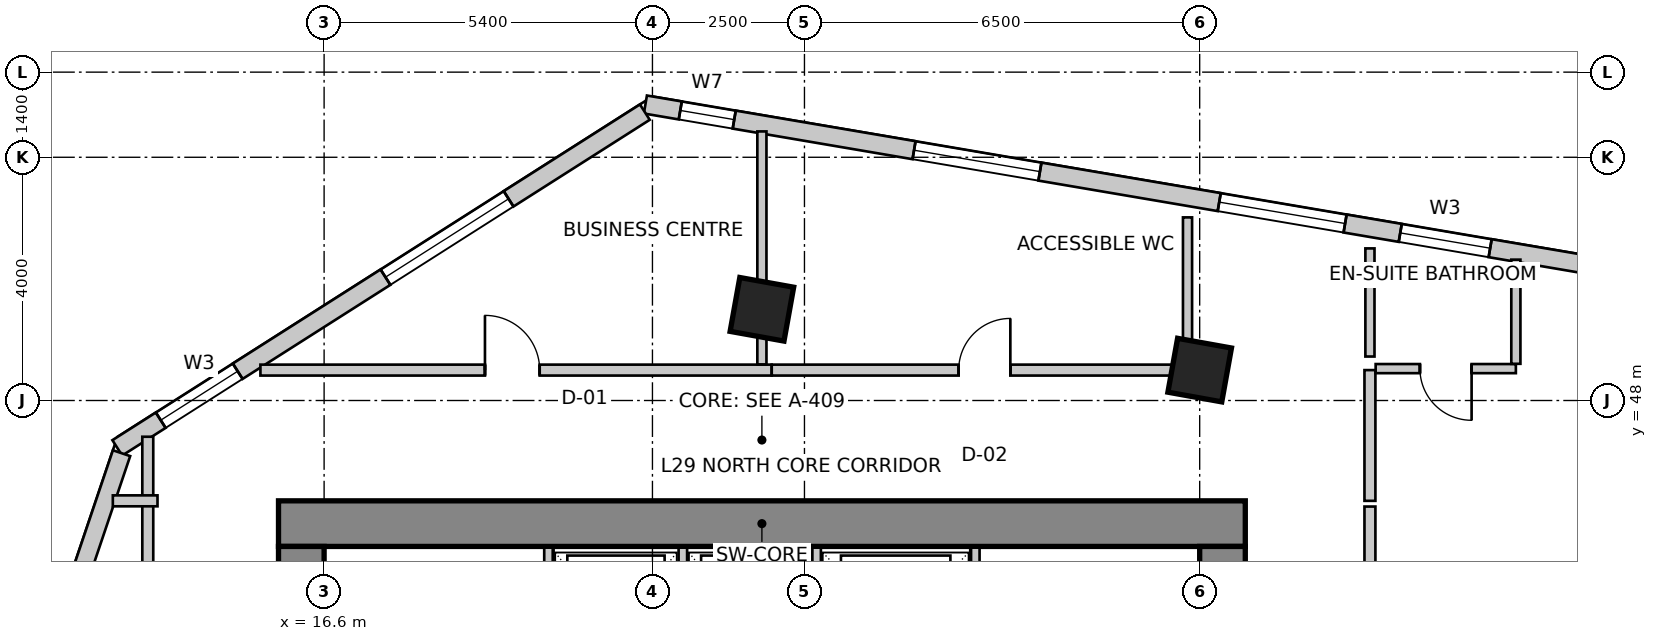
"""IFC4 building model, lengths in metres.
Left out: names, types, materials, properties, quantities, classifications, styles, units other than length and angle.
Written with IfcOpenShell. Run it as: python <this file> out.ifc"""

import sys

from ifc_helpers import new_model, si_unit, direction, frame, frame_2d, origin, origin_2d, place, context, subcontext, project, spatial, rectangle, extrude, source, transform, mapped, element, fill, save


model = new_model("IFC4")
c1 = context("Model", 3, precision=1e-05, world=origin(), true_north=direction((0.0, 1.0)))
c2 = subcontext(c1, "Body", "Model", "MODEL_VIEW")
j1 = project(units=[si_unit("LENGTHUNIT", "METRE"), si_unit("PLANEANGLEUNIT", "RADIAN")], contexts=[c1])
p1 = place(None, origin())
s1 = spatial("IfcSite", under=j1, at=p1, CompositionType="ELEMENT")
p2 = place(p1, origin())
s2 = spatial("IfcBuilding", under=s1, at=p2, CompositionType="ELEMENT")
p3 = place(p2, frame((0.0, 0.0, 121.4)))
s3 = spatial("IfcBuildingStorey", under=s2, at=p3, CompositionType="ELEMENT", Elevation=121.4)
p4 = place(p3, frame((15.85, 45.975, 0.0), z_axis=(0.0, 0.0, 1.0), x_axis=(1.0, 0.0, 0.0)))
e1 = element("IfcWall", 1, at=p4, inside=s3, PredefinedType="SHEAR", context=c2, shape_type="SweptSolid", body=[
    extrude(rectangle(XDim=15.9, YDim=0.75, at=frame_2d((7.95, 0.0))), origin(), (0.0, 0.0, 1.0), 3.6),
])
p5 = place(p3, frame((16.225, 34.2, 0.0), z_axis=(0.0, 0.0, 1.0), x_axis=(0.0, 1.0, 0.0)))
e2 = element("IfcWall", 2, at=p5, inside=s3, PredefinedType="SHEAR", context=c2, shape_type="SweptSolid", body=[
    extrude(rectangle(XDim=11.4, YDim=0.75, at=frame_2d((5.7, 0.0))), origin(), (0.0, 0.0, 1.0), 3.6),
])
m1 = source(origin(), c2, "Body", "SweptSolid", [
    extrude(rectangle(XDim=1.1, YDim=2.15, at=frame_2d((0.55, 1.075))), frame((0.0, 0.385, 0.0), z_axis=(0.0, -1.0, 0.0), x_axis=(1.0, 0.0, 0.0)), (0.0, 0.0, 1.0), 0.77),
])
p6 = place(p5, frame((7.15, 0.0, 0.0)))
e3 = element("IfcOpeningElement", 3, at=p6, cuts=e2, PredefinedType="OPENING", context=c2, shape_type="MappedRepresentation", body=[
    mapped(m1, transform((0.0, 0.0, 0.0), scale=1.0)),
])
p7 = place(p3, frame((31.375, 34.2, 0.0), z_axis=(0.0, 0.0, 1.0), x_axis=(0.0, 1.0, 0.0)))
e4 = element("IfcWall", 4, at=p7, inside=s3, PredefinedType="SHEAR", context=c2, shape_type="SweptSolid", body=[
    extrude(rectangle(XDim=11.4, YDim=0.75, at=frame_2d((5.7, 0.0))), origin(), (0.0, 0.0, 1.0), 3.6),
])
p8 = place(p7, frame((7.35, 0.0, 0.0)))
e5 = element("IfcOpeningElement", 5, at=p8, cuts=e4, PredefinedType="OPENING", context=c2, shape_type="MappedRepresentation", body=[
    mapped(m1, transform((0.0, 0.0, 0.0), scale=1.0)),
])
m2 = source(origin(), c2, "Body", "SweptSolid", [
    extrude(rectangle(XDim=0.9, YDim=0.9, at=origin_2d()), origin(), (0.0, 0.0, 1.0), 3.6),
])
for number, where, z_axis, x_axis in (
    (6, (23.8, 49.5, 0.0), (0.0, 0.0, 1.0), (0.984, -0.177, 0.0)),
    (7, (31.0, 48.5, 0.0), (0.0, 0.0, 1.0), (0.984, -0.177, 0.0)),
):
    element("IfcColumn", number, at=place(p3, frame(where, z_axis=z_axis, x_axis=x_axis)), inside=s3, PredefinedType="COLUMN", context=c2, shape_type="MappedRepresentation", body=[
        mapped(m2, transform((0.0, 0.0, 0.0), scale=1.0)),
    ])
p9 = place(p3, frame((53.561, 47.48, 0.0), z_axis=(0.0, 0.0, 1.0), x_axis=(-0.985845173895, 0.167658262868, 0.0)))
e8 = element("IfcWall", 8, at=p9, inside=s3, PredefinedType="SOLIDWALL", context=c2, shape_type="SweptSolid", body=[
    extrude(rectangle(XDim=32.132, YDim=0.3, at=frame_2d((16.066, 0.0))), origin(), (0.0, 0.0, 1.0), 3.35),
])
m3 = source(origin(), c2, "Body", "SweptSolid", [
    extrude(rectangle(XDim=2.1, YDim=2.0, at=frame_2d((1.05, 1.0))), frame((0.0, 0.16, 0.0), z_axis=(0.0, -1.0, 0.0), x_axis=(1.0, 0.0, 0.0)), (0.0, 0.0, 1.0), 0.32),
])
p10 = place(p9, frame((1.032, 0.0, 0.85)))
e9 = element("IfcOpeningElement", 9, at=p10, cuts=e8, PredefinedType="OPENING", context=c2, shape_type="MappedRepresentation", body=[
    mapped(m3, transform((0.0, 0.0, 0.0), scale=1.0)),
])
p11 = place(p9, frame((6.836, 0.0, 0.85)))
e10 = element("IfcOpeningElement", 10, at=p11, cuts=e8, PredefinedType="OPENING", context=c2, shape_type="MappedRepresentation", body=[
    mapped(m3, transform((0.0, 0.0, 0.0), scale=1.0)),
])
p12 = place(p9, frame((13.599, 0.0, 0.85)))
e11 = element("IfcOpeningElement", 11, at=p12, cuts=e8, PredefinedType="OPENING", context=c2, shape_type="MappedRepresentation", body=[
    mapped(m3, transform((0.0, 0.0, 0.0), scale=1.0)),
])
m4 = source(origin(), c2, "Body", "SweptSolid", [
    extrude(rectangle(XDim=1.5, YDim=1.8, at=frame_2d((0.75, 0.9))), frame((0.0, 0.16, 0.0), z_axis=(0.0, -1.0, 0.0), x_axis=(1.0, 0.0, 0.0)), (0.0, 0.0, 1.0), 0.32),
])
p13 = place(p9, frame((18.039, 0.0, 0.85)))
e12 = element("IfcOpeningElement", 12, at=p13, cuts=e8, PredefinedType="OPENING", context=c2, shape_type="MappedRepresentation", body=[
    mapped(m4, transform((0.0, 0.0, 0.0), scale=1.0)),
])
p14 = place(p9, frame((20.459, 0.0, 0.85)))
e13 = element("IfcOpeningElement", 13, at=p14, cuts=e8, PredefinedType="OPENING", context=c2, shape_type="MappedRepresentation", body=[
    mapped(m3, transform((0.0, 0.0, 0.0), scale=1.0)),
])
p15 = place(p9, frame((25.55, 0.0, 0.85)))
e14 = element("IfcOpeningElement", 14, at=p15, cuts=e8, PredefinedType="OPENING", context=c2, shape_type="MappedRepresentation", body=[
    mapped(m3, transform((0.0, 0.0, 0.0), scale=1.0)),
])
m5 = source(origin(), c2, "Body", "SweptSolid", [
    extrude(rectangle(XDim=0.9, YDim=1.6, at=frame_2d((0.45, 0.8))), frame((0.0, 0.16, 0.0), z_axis=(0.0, -1.0, 0.0), x_axis=(1.0, 0.0, 0.0)), (0.0, 0.0, 1.0), 0.32),
])
p16 = place(p9, frame((30.65, 0.0, 0.85)))
e15 = element("IfcOpeningElement", 15, at=p16, cuts=e8, PredefinedType="OPENING", context=c2, shape_type="MappedRepresentation", body=[
    mapped(m5, transform((0.0, 0.0, 0.0), scale=1.0)),
])
p17 = place(p3, frame((21.875, 52.742, 0.0), z_axis=(0.0, 0.0, 1.0), x_axis=(-0.843662465249, -0.536873956092, 0.0)))
e16 = element("IfcWall", 16, at=p17, inside=s3, PredefinedType="SOLIDWALL", context=c2, shape_type="SweptSolid", body=[
    extrude(rectangle(XDim=10.284, YDim=0.3, at=frame_2d((5.142, 0.0))), origin(), (0.0, 0.0, 1.0), 3.35),
])
m6 = source(origin(), c2, "Body", "SweptSolid", [
    extrude(rectangle(XDim=2.4, YDim=2.2, at=frame_2d((1.2, 1.1))), frame((0.0, 0.16, 0.0), z_axis=(0.0, -1.0, 0.0), x_axis=(1.0, 0.0, 0.0)), (0.0, 0.0, 1.0), 0.32),
])
p18 = place(p17, frame((2.656, 0.0, 0.85)))
e17 = element("IfcOpeningElement", 17, at=p18, cuts=e16, PredefinedType="OPENING", context=c2, shape_type="MappedRepresentation", body=[
    mapped(m6, transform((0.0, 0.0, 0.0), scale=1.0)),
])
p19 = place(p17, frame((7.937, 0.0, 0.85)))
e18 = element("IfcOpeningElement", 18, at=p19, cuts=e16, PredefinedType="OPENING", context=c2, shape_type="MappedRepresentation", body=[
    mapped(m4, transform((0.0, 0.0, 0.0), scale=1.0)),
])
p20 = place(p3, frame((13.269, 47.134, 0.0), z_axis=(0.0, 0.0, 1.0), x_axis=(-0.319929596295, -0.947441319246, 0.0)))
e19 = element("IfcWall", 19, at=p20, inside=s3, PredefinedType="SOLIDWALL", context=c2, shape_type="SweptSolid", body=[
    extrude(rectangle(XDim=16.134, YDim=0.3, at=frame_2d((8.067, 0.0))), origin(), (0.0, 0.0, 1.0), 3.35),
])
p21 = place(p20, frame((2.426, 0.0, 0.85)))
e20 = element("IfcOpeningElement", 20, at=p21, cuts=e19, PredefinedType="OPENING", context=c2, shape_type="MappedRepresentation", body=[
    mapped(m3, transform((0.0, 0.0, 0.0), scale=1.0)),
])
p22 = place(p20, frame((7.211, 0.0, 0.85)))
e21 = element("IfcOpeningElement", 21, at=p22, cuts=e19, PredefinedType="OPENING", context=c2, shape_type="MappedRepresentation", body=[
    mapped(m6, transform((0.0, 0.0, 0.0), scale=1.0)),
])
p23 = place(p20, frame((12.297, 0.0, 0.85)))
e22 = element("IfcOpeningElement", 22, at=p23, cuts=e19, PredefinedType="OPENING", context=c2, shape_type="MappedRepresentation", body=[
    mapped(m3, transform((0.0, 0.0, 0.0), scale=1.0)),
])
for number, where, z_axis, x_axis in (
    (23, (20.29, 43.28, 0.0), (0.0, 0.0, 1.0), (0.0, 1.0, 0.0)),
    (24, (27.31, 43.28, 0.0), (0.0, 0.0, 1.0), (0.0, 1.0, 0.0)),
):
    element("IfcWall", number, at=place(p3, frame(where, z_axis=z_axis, x_axis=x_axis)), inside=s3, PredefinedType="SOLIDWALL", context=c2, shape_type="SweptSolid", body=[
        extrude(rectangle(XDim=2.3, YDim=0.14, at=frame_2d((1.15, 0.0))), origin(), (0.0, 0.0, 1.0), 3.35),
    ])
for number, where, z_axis, x_axis in (
    (25, (22.5, 43.02, 0.0), (0.0, 0.0, 1.0), (0.0, 1.0, 0.0)),
    (26, (24.7, 43.02, 0.0), (0.0, 0.0, 1.0), (0.0, 1.0, 0.0)),
):
    element("IfcWall", number, at=place(p3, frame(where, z_axis=z_axis, x_axis=x_axis)), inside=s3, PredefinedType="SOLIDWALL", context=c2, shape_type="SweptSolid", body=[
        extrude(rectangle(XDim=2.56, YDim=0.14, at=frame_2d((1.28, 0.0))), origin(), (0.0, 0.0, 1.0), 3.35),
    ])
p24 = place(p3, frame((13.7, 33.544, 0.0), z_axis=(0.0, 0.0, 1.0), x_axis=(0.0, 1.0, 0.0)))
e27 = element("IfcWall", 27, at=p24, inside=s3, PredefinedType="PARTITIONING", context=c2, shape_type="SweptSolid", body=[
    extrude(rectangle(XDim=13.86, YDim=0.18, at=frame_2d((6.93, 0.0))), origin(), (0.0, 0.0, 1.0), 2.492),
])
m7 = source(origin(), c2, "Body", "SweptSolid", [
    extrude(rectangle(XDim=0.9, YDim=2.15, at=frame_2d((0.45, 1.075))), frame((0.0, 0.1, 0.0), z_axis=(0.0, -1.0, 0.0), x_axis=(1.0, 0.0, 0.0)), (0.0, 0.0, 1.0), 0.2),
])
p25 = place(p24, frame((4.253, 0.0, 0.0)))
e28 = element("IfcOpeningElement", 28, at=p25, cuts=e27, PredefinedType="OPENING", context=c2, shape_type="MappedRepresentation", body=[
    mapped(m7, transform((0.0, 0.0, 0.0), scale=1.0)),
])
p26 = place(p3, frame((13.86, 46.35, 0.0), z_axis=(0.0, 0.0, 1.0), x_axis=(-1.0, 0.0, 0.0)))
e29 = element("IfcWall", 29, at=p26, inside=s3, PredefinedType="PARTITIONING", context=c2, shape_type="SweptSolid", body=[
    extrude(rectangle(XDim=0.735, YDim=0.18, at=frame_2d((0.367, 0.0))), origin(), (0.0, 0.0, 1.0), 3.35),
])
p27 = place(p3, frame((15.552, 48.5, 0.0), z_axis=(0.0, 0.0, 1.0), x_axis=(1.0, 0.0, 0.0)))
e30 = element("IfcWall", 30, at=p27, inside=s3, PredefinedType="PARTITIONING", context=c2, shape_type="SweptSolid", body=[
    extrude(rectangle(XDim=8.407, YDim=0.18, at=frame_2d((4.204, 0.0))), origin(), (0.0, 0.0, 1.0), 3.034),
])
p28 = place(p27, frame((3.693, 0.0, 0.0)))
e31 = element("IfcOpeningElement", 31, at=p28, cuts=e30, PredefinedType="OPENING", context=c2, shape_type="MappedRepresentation", body=[
    mapped(m7, transform((0.0, 0.0, 0.0), scale=1.0)),
])
p29 = place(p3, frame((23.962, 48.5, 0.0), z_axis=(0.0, 0.0, 1.0), x_axis=(1.0, 0.0, 0.0)))
e32 = element("IfcWall", 32, at=p29, inside=s3, PredefinedType="PARTITIONING", context=c2, shape_type="SweptSolid", body=[
    extrude(rectangle(XDim=6.998, YDim=0.18, at=frame_2d((3.499, 0.0))), origin(), (0.0, 0.0, 1.0), 2.492),
])
m8 = source(origin(), c2, "Body", "SweptSolid", [
    extrude(rectangle(XDim=0.85, YDim=2.15, at=frame_2d((0.425, 1.075))), frame((0.0, 0.1, 0.0), z_axis=(0.0, -1.0, 0.0), x_axis=(1.0, 0.0, 0.0)), (0.0, 0.0, 1.0), 0.2),
])
p30 = place(p29, frame((3.074, 0.0, 0.0)))
e33 = element("IfcOpeningElement", 33, at=p30, cuts=e32, PredefinedType="OPENING", context=c2, shape_type="MappedRepresentation", body=[
    mapped(m8, transform((0.0, 0.0, 0.0), scale=1.0)),
])
p31 = place(p3, frame((33.8, 48.5, 0.0), z_axis=(0.0, 0.0, 1.0), x_axis=(0.0, -1.0, 0.0)))
e34 = element("IfcWall", 34, at=p31, inside=s3, PredefinedType="PARTITIONING", context=c2, shape_type="SweptSolid", body=[
    extrude(rectangle(XDim=2.15, YDim=0.18, at=frame_2d((1.075, 0.0))), origin(), (0.0, 0.0, 1.0), 2.492),
])
p32 = place(p3, frame((33.8, 46.256, 0.0), z_axis=(0.0, 0.0, 1.0), x_axis=(0.0, -1.0, 0.0)))
e35 = element("IfcWall", 35, at=p32, inside=s3, PredefinedType="PARTITIONING", context=c2, shape_type="SweptSolid", body=[
    extrude(rectangle(XDim=3.716, YDim=0.18, at=frame_2d((1.858, 0.0))), origin(), (0.0, 0.0, 1.0), 2.922),
])
p33 = place(p3, frame((23.8, 52.425, 0.0), z_axis=(0.0, 0.0, 1.0), x_axis=(0.0, -1.0, 0.0)))
e36 = element("IfcWall", 36, at=p33, inside=s3, PredefinedType="PARTITIONING", context=c2, shape_type="SweptSolid", body=[
    extrude(rectangle(XDim=3.831, YDim=0.15, at=frame_2d((1.916, 0.0))), origin(), (0.0, 0.0, 1.0), 2.492),
])
p34 = place(p3, frame((36.2, 48.524, 0.0), z_axis=(0.0, 0.0, 1.0), x_axis=(-1.0, 0.0, 0.0)))
e37 = element("IfcWall", 37, at=p34, inside=s3, PredefinedType="PARTITIONING", context=c2, shape_type="SweptSolid", body=[
    extrude(rectangle(XDim=2.306, YDim=0.15, at=frame_2d((1.153, 0.0))), origin(), (0.0, 0.0, 1.0), 3.35),
])
m9 = source(origin(), c2, "Body", "SweptSolid", [
    extrude(rectangle(XDim=0.85, YDim=2.15, at=frame_2d((0.425, 1.075))), frame((0.0, 0.085, 0.0), z_axis=(0.0, -1.0, 0.0), x_axis=(1.0, 0.0, 0.0)), (0.0, 0.0, 1.0), 0.17),
])
p35 = place(p34, frame((0.728, 0.0, 0.0)))
e38 = element("IfcOpeningElement", 38, at=p35, cuts=e37, PredefinedType="OPENING", context=c2, shape_type="MappedRepresentation", body=[
    mapped(m9, transform((0.0, 0.0, 0.0), scale=1.0)),
])
p36 = place(p3, frame((36.2, 50.316, 0.0), z_axis=(0.0, 0.0, 1.0), x_axis=(0.0, -1.0, 0.0)))
e39 = element("IfcWall", 39, at=p36, inside=s3, PredefinedType="PARTITIONING", context=c2, shape_type="SweptSolid", body=[
    extrude(rectangle(XDim=1.713, YDim=0.15, at=frame_2d((0.856, 0.0))), origin(), (0.0, 0.0, 1.0), 3.35),
])
p37 = place(p3, frame((30.8, 51.011, 0.0), z_axis=(0.0, 0.0, 1.0), x_axis=(0.0, -1.0, 0.0)))
e40 = element("IfcWall", 40, at=p37, inside=s3, PredefinedType="PARTITIONING", context=c2, shape_type="SweptSolid", body=[
    extrude(rectangle(XDim=2.292, YDim=0.15, at=frame_2d((1.146, 0.0))), origin(), (0.0, 0.0, 1.0), 3.35),
])
p38 = place(p3, frame((33.8, 48.723, 0.0), z_axis=(0.0, 0.0, 1.0), x_axis=(0.0, 1.0, 0.0)))
e41 = element("IfcWall", 41, at=p38, inside=s3, PredefinedType="PARTITIONING", context=c2, shape_type="SweptSolid", body=[
    extrude(rectangle(XDim=1.778, YDim=0.15, at=frame_2d((0.889, 0.0))), origin(), (0.0, 0.0, 1.0), 3.35),
])
m10 = source(origin(), c2, "Body", "SweptSolid", [
    extrude(rectangle(XDim=1.5, YDim=1.8, at=frame_2d((0.75, 0.9))), frame((0.0, -0.015, 0.0), z_axis=(0.0, -1.0, 0.0), x_axis=(1.0, 0.0, 0.0)), (0.0, 0.0, 1.0), 0.06),
])
p39 = place(p13, origin())
e42 = element("IfcWindow", 42, at=p39, inside=s3, PartitioningType="SINGLE_PANEL", PredefinedType="WINDOW", context=c2, shape_type="MappedRepresentation", body=[
    mapped(m10, transform((0.0, 0.0, 0.0), scale=1.0)),
])
fill(e12, e42)
m11 = source(origin(), c2, "Body", "SweptSolid", [
    extrude(rectangle(XDim=2.1, YDim=2.0, at=frame_2d((1.05, 1.0))), frame((0.0, -0.015, 0.0), z_axis=(0.0, -1.0, 0.0), x_axis=(1.0, 0.0, 0.0)), (0.0, 0.0, 1.0), 0.06),
])
p40 = place(p14, origin())
e43 = element("IfcWindow", 43, at=p40, inside=s3, PartitioningType="SINGLE_PANEL", PredefinedType="WINDOW", context=c2, shape_type="MappedRepresentation", body=[
    mapped(m11, transform((0.0, 0.0, 0.0), scale=1.0)),
])
fill(e13, e43)
p41 = place(p15, origin())
e44 = element("IfcWindow", 44, at=p41, inside=s3, PartitioningType="SINGLE_PANEL", PredefinedType="WINDOW", context=c2, shape_type="MappedRepresentation", body=[
    mapped(m11, transform((0.0, 0.0, 0.0), scale=1.0)),
])
fill(e14, e44)
m12 = source(origin(), c2, "Body", "SweptSolid", [
    extrude(rectangle(XDim=0.9, YDim=1.6, at=frame_2d((0.45, 0.8))), frame((0.0, -0.015, 0.0), z_axis=(0.0, -1.0, 0.0), x_axis=(1.0, 0.0, 0.0)), (0.0, 0.0, 1.0), 0.06),
])
p42 = place(p16, origin())
e45 = element("IfcWindow", 45, at=p42, inside=s3, PartitioningType="SINGLE_PANEL", PredefinedType="WINDOW", context=c2, shape_type="MappedRepresentation", body=[
    mapped(m12, transform((0.0, 0.0, 0.0), scale=1.0)),
])
fill(e15, e45)
m13 = source(origin(), c2, "Body", "SweptSolid", [
    extrude(rectangle(XDim=2.4, YDim=2.2, at=frame_2d((1.2, 1.1))), frame((0.0, -0.015, 0.0), z_axis=(0.0, -1.0, 0.0), x_axis=(1.0, 0.0, 0.0)), (0.0, 0.0, 1.0), 0.06),
])
p43 = place(p18, origin())
e46 = element("IfcWindow", 46, at=p43, inside=s3, PartitioningType="SINGLE_PANEL", PredefinedType="WINDOW", context=c2, shape_type="MappedRepresentation", body=[
    mapped(m13, transform((0.0, 0.0, 0.0), scale=1.0)),
])
fill(e17, e46)
p44 = place(p19, origin())
e47 = element("IfcWindow", 47, at=p44, inside=s3, PartitioningType="SINGLE_PANEL", PredefinedType="WINDOW", context=c2, shape_type="MappedRepresentation", body=[
    mapped(m10, transform((0.0, 0.0, 0.0), scale=1.0)),
])
fill(e18, e47)
m14 = source(origin(), c2, "Body", "SweptSolid", [
    extrude(rectangle(XDim=0.9, YDim=2.15, at=frame_2d((0.45, 1.075))), frame((0.0, 0.025, 0.0), z_axis=(0.0, -1.0, 0.0), x_axis=(1.0, 0.0, 0.0)), (0.0, 0.0, 1.0), 0.05),
])
p45 = place(p28, origin())
e48 = element("IfcDoor", 48, at=p45, inside=s3, OperationType="SINGLE_SWING_LEFT", PredefinedType="DOOR", context=c2, shape_type="MappedRepresentation", body=[
    mapped(m14, transform((0.0, 0.0, 0.0), scale=1.0)),
])
fill(e31, e48)
m15 = source(origin(), c2, "Body", "SweptSolid", [
    extrude(rectangle(XDim=0.85, YDim=2.15, at=frame_2d((0.425, 1.075))), frame((0.0, 0.025, 0.0), z_axis=(0.0, -1.0, 0.0), x_axis=(1.0, 0.0, 0.0)), (0.0, 0.0, 1.0), 0.05),
])
p46 = place(p30, origin())
e49 = element("IfcDoor", 49, at=p46, inside=s3, OperationType="SINGLE_SWING_RIGHT", PredefinedType="DOOR", context=c2, shape_type="MappedRepresentation", body=[
    mapped(m15, transform((0.0, 0.0, 0.0), scale=1.0)),
])
fill(e33, e49)
p47 = place(p35, origin())
e50 = element("IfcDoor", 50, at=p47, inside=s3, OperationType="SINGLE_SWING_LEFT", PredefinedType="DOOR", context=c2, shape_type="MappedRepresentation", body=[
    mapped(m15, transform((0.0, 0.0, 0.0), scale=1.0)),
])
fill(e38, e50)
save(model, sys.argv[1])
